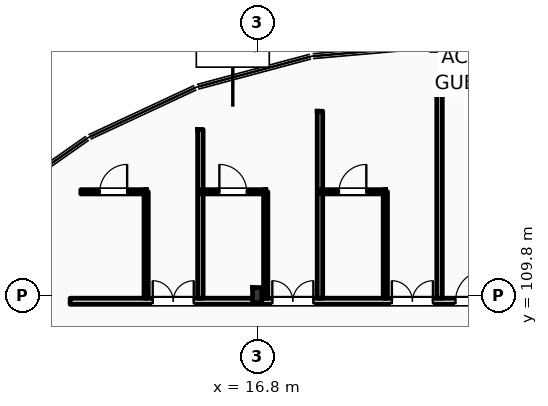
"""IFC4 building model, lengths in metres.
Left out: names, types, materials, properties, quantities, classifications, styles, units other than length and angle.
Written with IfcOpenShell. Run it as: python <this file> out.ifc"""

import sys

from ifc_helpers import new_model, si_unit, direction, frame, frame_2d, origin, origin_2d, place, context, subcontext, project, spatial, rectangle, i_section, extrude, element, fill, save


model = new_model("IFC4")
c1 = context("Model", 3, precision=1e-05, world=origin(), true_north=direction((0.0, 1.0)))
c2 = subcontext(c1, "Body", "Model", "MODEL_VIEW")
j1 = project(units=[si_unit("LENGTHUNIT", "METRE"), si_unit("PLANEANGLEUNIT", "RADIAN")], contexts=[c1])
p1 = place(None, origin())
s1 = spatial("IfcSite", under=j1, at=p1, CompositionType="ELEMENT")
p2 = place(p1, origin())
s2 = spatial("IfcBuilding", under=s1, at=p2, CompositionType="ELEMENT")
p3 = place(p2, frame((0.0, 0.0, 35.4)))
s3 = spatial("IfcBuildingStorey", under=s2, at=p3, CompositionType="ELEMENT", Elevation=35.4)
p4 = place(p3, frame((16.8, 109.8, 0.0), z_axis=(0.0, 0.0, 1.0), x_axis=(1.0, 0.0, 0.0)))
e1 = element("IfcColumn", 1, at=p4, inside=s3, PredefinedType="COLUMN", context=c2, shape_type="SweptSolid", body=[
    extrude(i_section(OverallWidth=0.3, OverallDepth=0.5, WebThickness=0.014, FlangeThickness=0.028, FilletRadius=0.027, at=origin_2d()), origin(), (0.0, 0.0, 1.0), 3.6),
])
p5 = place(p3, frame((10.65, 109.6, 0.0), z_axis=(0.0, 0.0, 1.0), x_axis=(1.0, 0.0, 0.0)))
e2 = element("IfcWall", 2, at=p5, inside=s3, PredefinedType="PARTITIONING", context=c2, shape_type="SweptSolid", body=[
    extrude(rectangle(XDim=84.61, YDim=0.2, at=frame_2d((42.305, 0.0))), origin(), (0.0, 0.0, 1.0), 2.82),
])
p6 = place(p5, frame((12.675, 0.0, 0.0)))
e3 = element("IfcOpeningElement", 3, at=p6, cuts=e2, PredefinedType="OPENING", context=c2, shape_type="SweptSolid", body=[
    extrude(rectangle(XDim=1.02, YDim=2.2, at=frame_2d((0.51, 1.1))), frame((0.0, 0.11, 0.0), z_axis=(0.0, -1.0, 0.0), x_axis=(1.0, 0.0, 0.0)), (0.0, 0.0, 1.0), 0.22),
])
p7 = place(p5, frame((19.62, 0.0, 0.0)))
e4 = element("IfcOpeningElement", 4, at=p7, cuts=e2, PredefinedType="OPENING", context=c2, shape_type="SweptSolid", body=[
    extrude(rectangle(XDim=1.02, YDim=2.2, at=frame_2d((0.51, 1.1))), frame((0.0, 0.11, 0.0), z_axis=(0.0, -1.0, 0.0), x_axis=(1.0, 0.0, 0.0)), (0.0, 0.0, 1.0), 0.22),
])
p8 = place(p5, frame((24.12, 0.0, 0.0)))
e5 = element("IfcOpeningElement", 5, at=p8, cuts=e2, PredefinedType="OPENING", context=c2, shape_type="SweptSolid", body=[
    extrude(rectangle(XDim=1.02, YDim=2.2, at=frame_2d((0.51, 1.1))), frame((0.0, 0.11, 0.0), z_axis=(0.0, -1.0, 0.0), x_axis=(1.0, 0.0, 0.0)), (0.0, 0.0, 1.0), 0.22),
])
p9 = place(p5, frame((26.47, 0.0, 0.0)))
e6 = element("IfcOpeningElement", 6, at=p9, cuts=e2, PredefinedType="OPENING", context=c2, shape_type="SweptSolid", body=[
    extrude(rectangle(XDim=1.02, YDim=2.2, at=frame_2d((0.51, 1.1))), frame((0.0, 0.11, 0.0), z_axis=(0.0, -1.0, 0.0), x_axis=(1.0, 0.0, 0.0)), (0.0, 0.0, 1.0), 0.22),
])
p10 = place(p5, frame((33.15, 0.0, 0.0)))
e7 = element("IfcOpeningElement", 7, at=p10, cuts=e2, PredefinedType="OPENING", context=c2, shape_type="SweptSolid", body=[
    extrude(rectangle(XDim=0.96, YDim=2.2, at=frame_2d((0.48, 1.1))), frame((0.0, 0.11, 0.0), z_axis=(0.0, -1.0, 0.0), x_axis=(1.0, 0.0, 0.0)), (0.0, 0.0, 1.0), 0.22),
])
p11 = place(p5, frame((35.5, 0.0, 0.0)))
e8 = element("IfcOpeningElement", 8, at=p11, cuts=e2, PredefinedType="OPENING", context=c2, shape_type="SweptSolid", body=[
    extrude(rectangle(XDim=0.96, YDim=2.2, at=frame_2d((0.48, 1.1))), frame((0.0, 0.11, 0.0), z_axis=(0.0, -1.0, 0.0), x_axis=(1.0, 0.0, 0.0)), (0.0, 0.0, 1.0), 0.22),
])
p12 = place(p5, frame((42.15, 0.0, 0.0)))
e9 = element("IfcOpeningElement", 9, at=p12, cuts=e2, PredefinedType="OPENING", context=c2, shape_type="SweptSolid", body=[
    extrude(rectangle(XDim=0.96, YDim=2.2, at=frame_2d((0.48, 1.1))), frame((0.0, 0.11, 0.0), z_axis=(0.0, -1.0, 0.0), x_axis=(1.0, 0.0, 0.0)), (0.0, 0.0, 1.0), 0.22),
])
p13 = place(p5, frame((47.15, 0.0, 0.0)))
e10 = element("IfcOpeningElement", 10, at=p13, cuts=e2, PredefinedType="OPENING", context=c2, shape_type="SweptSolid", body=[
    extrude(rectangle(XDim=0.96, YDim=2.2, at=frame_2d((0.48, 1.1))), frame((0.0, 0.11, 0.0), z_axis=(0.0, -1.0, 0.0), x_axis=(1.0, 0.0, 0.0)), (0.0, 0.0, 1.0), 0.22),
])
p14 = place(p5, frame((51.15, 0.0, 0.0)))
e11 = element("IfcOpeningElement", 11, at=p14, cuts=e2, PredefinedType="OPENING", context=c2, shape_type="SweptSolid", body=[
    extrude(rectangle(XDim=0.96, YDim=2.2, at=frame_2d((0.48, 1.1))), frame((0.0, 0.11, 0.0), z_axis=(0.0, -1.0, 0.0), x_axis=(1.0, 0.0, 0.0)), (0.0, 0.0, 1.0), 0.22),
])
p15 = place(p5, frame((55.65, 0.0, 0.0)))
e12 = element("IfcOpeningElement", 12, at=p15, cuts=e2, PredefinedType="OPENING", context=c2, shape_type="SweptSolid", body=[
    extrude(rectangle(XDim=0.96, YDim=2.2, at=frame_2d((0.48, 1.1))), frame((0.0, 0.11, 0.0), z_axis=(0.0, -1.0, 0.0), x_axis=(1.0, 0.0, 0.0)), (0.0, 0.0, 1.0), 0.22),
])
p16 = place(p5, frame((58.0, 0.0, 0.0)))
e13 = element("IfcOpeningElement", 13, at=p16, cuts=e2, PredefinedType="OPENING", context=c2, shape_type="SweptSolid", body=[
    extrude(rectangle(XDim=0.96, YDim=2.2, at=frame_2d((0.48, 1.1))), frame((0.0, 0.11, 0.0), z_axis=(0.0, -1.0, 0.0), x_axis=(1.0, 0.0, 0.0)), (0.0, 0.0, 1.0), 0.22),
])
p17 = place(p5, frame((64.65, 0.0, 0.0)))
e14 = element("IfcOpeningElement", 14, at=p17, cuts=e2, PredefinedType="OPENING", context=c2, shape_type="SweptSolid", body=[
    extrude(rectangle(XDim=0.96, YDim=2.2, at=frame_2d((0.48, 1.1))), frame((0.0, 0.11, 0.0), z_axis=(0.0, -1.0, 0.0), x_axis=(1.0, 0.0, 0.0)), (0.0, 0.0, 1.0), 0.22),
])
p18 = place(p5, frame((66.75, 0.0, 0.0)))
e15 = element("IfcOpeningElement", 15, at=p18, cuts=e2, PredefinedType="OPENING", context=c2, shape_type="SweptSolid", body=[
    extrude(rectangle(XDim=0.96, YDim=2.2, at=frame_2d((0.48, 1.1))), frame((0.0, 0.11, 0.0), z_axis=(0.0, -1.0, 0.0), x_axis=(1.0, 0.0, 0.0)), (0.0, 0.0, 1.0), 0.22),
])
p19 = place(p5, frame((73.65, 0.0, 0.0)))
e16 = element("IfcOpeningElement", 16, at=p19, cuts=e2, PredefinedType="OPENING", context=c2, shape_type="SweptSolid", body=[
    extrude(rectangle(XDim=0.96, YDim=2.2, at=frame_2d((0.48, 1.1))), frame((0.0, 0.11, 0.0), z_axis=(0.0, -1.0, 0.0), x_axis=(1.0, 0.0, 0.0)), (0.0, 0.0, 1.0), 0.22),
])
p20 = place(p5, frame((78.4, 0.0, 0.0)))
e17 = element("IfcOpeningElement", 17, at=p20, cuts=e2, PredefinedType="OPENING", context=c2, shape_type="SweptSolid", body=[
    extrude(rectangle(XDim=0.96, YDim=2.2, at=frame_2d((0.48, 1.1))), frame((0.0, 0.11, 0.0), z_axis=(0.0, -1.0, 0.0), x_axis=(1.0, 0.0, 0.0)), (0.0, 0.0, 1.0), 0.22),
])
p21 = place(p5, frame((80.455, 0.0, 0.0)))
e18 = element("IfcOpeningElement", 18, at=p21, cuts=e2, PredefinedType="OPENING", context=c2, shape_type="SweptSolid", body=[
    extrude(rectangle(XDim=0.96, YDim=2.2, at=frame_2d((0.48, 1.1))), frame((0.0, 0.11, 0.0), z_axis=(0.0, -1.0, 0.0), x_axis=(1.0, 0.0, 0.0)), (0.0, 0.0, 1.0), 0.22),
])
p22 = place(p5, frame((2.716, 0.0, 0.0)))
e19 = element("IfcOpeningElement", 19, at=p22, cuts=e2, PredefinedType="OPENING", context=c2, shape_type="SweptSolid", body=[
    extrude(rectangle(XDim=1.35, YDim=2.25, at=frame_2d((0.675, 1.125))), frame((0.0, 0.11, 0.0), z_axis=(0.0, -1.0, 0.0), x_axis=(1.0, 0.0, 0.0)), (0.0, 0.0, 1.0), 0.22),
])
p23 = place(p5, frame((6.65, 0.0, 0.0)))
e20 = element("IfcOpeningElement", 20, at=p23, cuts=e2, PredefinedType="OPENING", context=c2, shape_type="SweptSolid", body=[
    extrude(rectangle(XDim=1.35, YDim=2.25, at=frame_2d((0.675, 1.125))), frame((0.0, 0.11, 0.0), z_axis=(0.0, -1.0, 0.0), x_axis=(1.0, 0.0, 0.0)), (0.0, 0.0, 1.0), 0.22),
])
p24 = place(p5, frame((10.583, 0.0, 0.0)))
e21 = element("IfcOpeningElement", 21, at=p24, cuts=e2, PredefinedType="OPENING", context=c2, shape_type="SweptSolid", body=[
    extrude(rectangle(XDim=1.35, YDim=2.25, at=frame_2d((0.675, 1.125))), frame((0.0, 0.11, 0.0), z_axis=(0.0, -1.0, 0.0), x_axis=(1.0, 0.0, 0.0)), (0.0, 0.0, 1.0), 0.22),
])
p25 = place(p3, frame((14.933, 109.7, 0.0), z_axis=(0.0, 0.0, 1.0), x_axis=(0.0, 1.0, 0.0)))
e22 = element("IfcWall", 22, at=p25, inside=s3, PredefinedType="PARTITIONING", context=c2, shape_type="SweptSolid", body=[
    extrude(rectangle(XDim=5.55, YDim=0.18, at=frame_2d((2.775, 0.0))), origin(), (0.0, 0.0, 1.0), 3.38),
])
p26 = place(p3, frame((13.15, 109.7, 0.0), z_axis=(0.0, 0.0, 1.0), x_axis=(0.0, 1.0, 0.0)))
e23 = element("IfcWall", 23, at=p26, inside=s3, PredefinedType="PARTITIONING", context=c2, shape_type="SweptSolid", body=[
    extrude(rectangle(XDim=3.5, YDim=0.14, at=frame_2d((1.75, 0.0))), origin(), (0.0, 0.0, 1.0), 3.38),
])
p27 = place(p3, frame((11.0, 113.2, 0.0), z_axis=(0.0, 0.0, 1.0), x_axis=(1.0, 0.0, 0.0)))
e24 = element("IfcWall", 24, at=p27, inside=s3, PredefinedType="PARTITIONING", context=c2, shape_type="SweptSolid", body=[
    extrude(rectangle(XDim=2.15, YDim=0.14, at=frame_2d((1.075, 0.0))), origin(), (0.0, 0.0, 1.0), 3.38),
])
p28 = place(p27, frame((0.625, 0.0, 0.0)))
e25 = element("IfcOpeningElement", 25, at=p28, cuts=e24, PredefinedType="OPENING", context=c2, shape_type="SweptSolid", body=[
    extrude(rectangle(XDim=0.9, YDim=2.1, at=frame_2d((0.45, 1.05))), frame((0.0, 0.08, 0.0), z_axis=(0.0, -1.0, 0.0), x_axis=(1.0, 0.0, 0.0)), (0.0, 0.0, 1.0), 0.16),
])
p29 = place(p3, frame((18.867, 109.7, 0.0), z_axis=(0.0, 0.0, 1.0), x_axis=(0.0, 1.0, 0.0)))
e26 = element("IfcWall", 26, at=p29, inside=s3, PredefinedType="PARTITIONING", context=c2, shape_type="SweptSolid", body=[
    extrude(rectangle(XDim=6.15, YDim=0.18, at=frame_2d((3.075, 0.0))), origin(), (0.0, 0.0, 1.0), 3.38),
])
p30 = place(p3, frame((17.083, 109.7, 0.0), z_axis=(0.0, 0.0, 1.0), x_axis=(0.0, 1.0, 0.0)))
e27 = element("IfcWall", 27, at=p30, inside=s3, PredefinedType="PARTITIONING", context=c2, shape_type="SweptSolid", body=[
    extrude(rectangle(XDim=3.5, YDim=0.14, at=frame_2d((1.75, 0.0))), origin(), (0.0, 0.0, 1.0), 3.38),
])
p31 = place(p3, frame((14.933, 113.2, 0.0), z_axis=(0.0, 0.0, 1.0), x_axis=(1.0, 0.0, 0.0)))
e28 = element("IfcWall", 28, at=p31, inside=s3, PredefinedType="PARTITIONING", context=c2, shape_type="SweptSolid", body=[
    extrude(rectangle(XDim=2.15, YDim=0.14, at=frame_2d((1.075, 0.0))), origin(), (0.0, 0.0, 1.0), 3.38),
])
p32 = place(p31, frame((0.625, 0.0, 0.0)))
e29 = element("IfcOpeningElement", 29, at=p32, cuts=e28, PredefinedType="OPENING", context=c2, shape_type="SweptSolid", body=[
    extrude(rectangle(XDim=0.9, YDim=2.1, at=frame_2d((0.45, 1.05))), frame((0.0, 0.08, 0.0), z_axis=(0.0, -1.0, 0.0), x_axis=(1.0, 0.0, 0.0)), (0.0, 0.0, 1.0), 0.16),
])
p33 = place(p3, frame((22.8, 109.7, 0.0), z_axis=(0.0, 0.0, 1.0), x_axis=(0.0, 1.0, 0.0)))
e30 = element("IfcWall", 30, at=p33, inside=s3, PredefinedType="PARTITIONING", context=c2, shape_type="SweptSolid", body=[
    extrude(rectangle(XDim=7.2, YDim=0.18, at=frame_2d((3.6, 0.0))), origin(), (0.0, 0.0, 1.0), 3.38),
])
p34 = place(p3, frame((21.017, 109.7, 0.0), z_axis=(0.0, 0.0, 1.0), x_axis=(0.0, 1.0, 0.0)))
e31 = element("IfcWall", 31, at=p34, inside=s3, PredefinedType="PARTITIONING", context=c2, shape_type="SweptSolid", body=[
    extrude(rectangle(XDim=3.5, YDim=0.14, at=frame_2d((1.75, 0.0))), origin(), (0.0, 0.0, 1.0), 3.38),
])
p35 = place(p3, frame((18.867, 113.2, 0.0), z_axis=(0.0, 0.0, 1.0), x_axis=(1.0, 0.0, 0.0)))
e32 = element("IfcWall", 32, at=p35, inside=s3, PredefinedType="PARTITIONING", context=c2, shape_type="SweptSolid", body=[
    extrude(rectangle(XDim=2.15, YDim=0.14, at=frame_2d((1.075, 0.0))), origin(), (0.0, 0.0, 1.0), 3.38),
])
p36 = place(p35, frame((0.625, 0.0, 0.0)))
e33 = element("IfcOpeningElement", 33, at=p36, cuts=e32, PredefinedType="OPENING", context=c2, shape_type="SweptSolid", body=[
    extrude(rectangle(XDim=0.9, YDim=2.1, at=frame_2d((0.45, 1.05))), frame((0.0, 0.08, 0.0), z_axis=(0.0, -1.0, 0.0), x_axis=(1.0, 0.0, 0.0)), (0.0, 0.0, 1.0), 0.16),
])
p37 = place(p6, origin())
e34 = element("IfcDoor", 34, at=p37, inside=s3, OperationType="SINGLE_SWING_RIGHT", PredefinedType="DOOR", context=c2, shape_type="SweptSolid", body=[
    extrude(rectangle(XDim=1.02, YDim=2.2, at=frame_2d((0.51, 1.1))), frame((0.0, 0.025, 0.0), z_axis=(0.0, -1.0, 0.0), x_axis=(1.0, 0.0, 0.0)), (0.0, 0.0, 1.0), 0.05),
])
fill(e3, e34)
p38 = place(p22, origin())
e35 = element("IfcDoor", 35, at=p38, inside=s3, OperationType="DOUBLE_SWING_LEFT", PredefinedType="DOOR", context=c2, shape_type="SweptSolid", body=[
    extrude(rectangle(XDim=1.35, YDim=2.25, at=frame_2d((0.675, 1.125))), frame((0.0, 0.025, 0.0), z_axis=(0.0, -1.0, 0.0), x_axis=(1.0, 0.0, 0.0)), (0.0, 0.0, 1.0), 0.05),
])
fill(e19, e35)
p39 = place(p28, origin())
e36 = element("IfcDoor", 36, at=p39, inside=s3, OperationType="SINGLE_SWING_RIGHT", PredefinedType="DOOR", context=c2, shape_type="SweptSolid", body=[
    extrude(rectangle(XDim=0.9, YDim=2.1, at=frame_2d((0.45, 1.05))), frame((0.0, 0.025, 0.0), z_axis=(0.0, -1.0, 0.0), x_axis=(1.0, 0.0, 0.0)), (0.0, 0.0, 1.0), 0.05),
])
fill(e25, e36)
p40 = place(p23, origin())
e37 = element("IfcDoor", 37, at=p40, inside=s3, OperationType="DOUBLE_SWING_LEFT", PredefinedType="DOOR", context=c2, shape_type="SweptSolid", body=[
    extrude(rectangle(XDim=1.35, YDim=2.25, at=frame_2d((0.675, 1.125))), frame((0.0, 0.025, 0.0), z_axis=(0.0, -1.0, 0.0), x_axis=(1.0, 0.0, 0.0)), (0.0, 0.0, 1.0), 0.05),
])
fill(e20, e37)
p41 = place(p32, origin())
e38 = element("IfcDoor", 38, at=p41, inside=s3, OperationType="SINGLE_SWING_LEFT", PredefinedType="DOOR", context=c2, shape_type="SweptSolid", body=[
    extrude(rectangle(XDim=0.9, YDim=2.1, at=frame_2d((0.45, 1.05))), frame((0.0, 0.025, 0.0), z_axis=(0.0, -1.0, 0.0), x_axis=(1.0, 0.0, 0.0)), (0.0, 0.0, 1.0), 0.05),
])
fill(e29, e38)
p42 = place(p24, origin())
e39 = element("IfcDoor", 39, at=p42, inside=s3, OperationType="DOUBLE_SWING_LEFT", PredefinedType="DOOR", context=c2, shape_type="SweptSolid", body=[
    extrude(rectangle(XDim=1.35, YDim=2.25, at=frame_2d((0.675, 1.125))), frame((0.0, 0.025, 0.0), z_axis=(0.0, -1.0, 0.0), x_axis=(1.0, 0.0, 0.0)), (0.0, 0.0, 1.0), 0.05),
])
fill(e21, e39)
p43 = place(p36, origin())
e40 = element("IfcDoor", 40, at=p43, inside=s3, OperationType="SINGLE_SWING_RIGHT", PredefinedType="DOOR", context=c2, shape_type="SweptSolid", body=[
    extrude(rectangle(XDim=0.9, YDim=2.1, at=frame_2d((0.45, 1.05))), frame((0.0, 0.025, 0.0), z_axis=(0.0, -1.0, 0.0), x_axis=(1.0, 0.0, 0.0)), (0.0, 0.0, 1.0), 0.05),
])
fill(e33, e40)
save(model, sys.argv[1])
